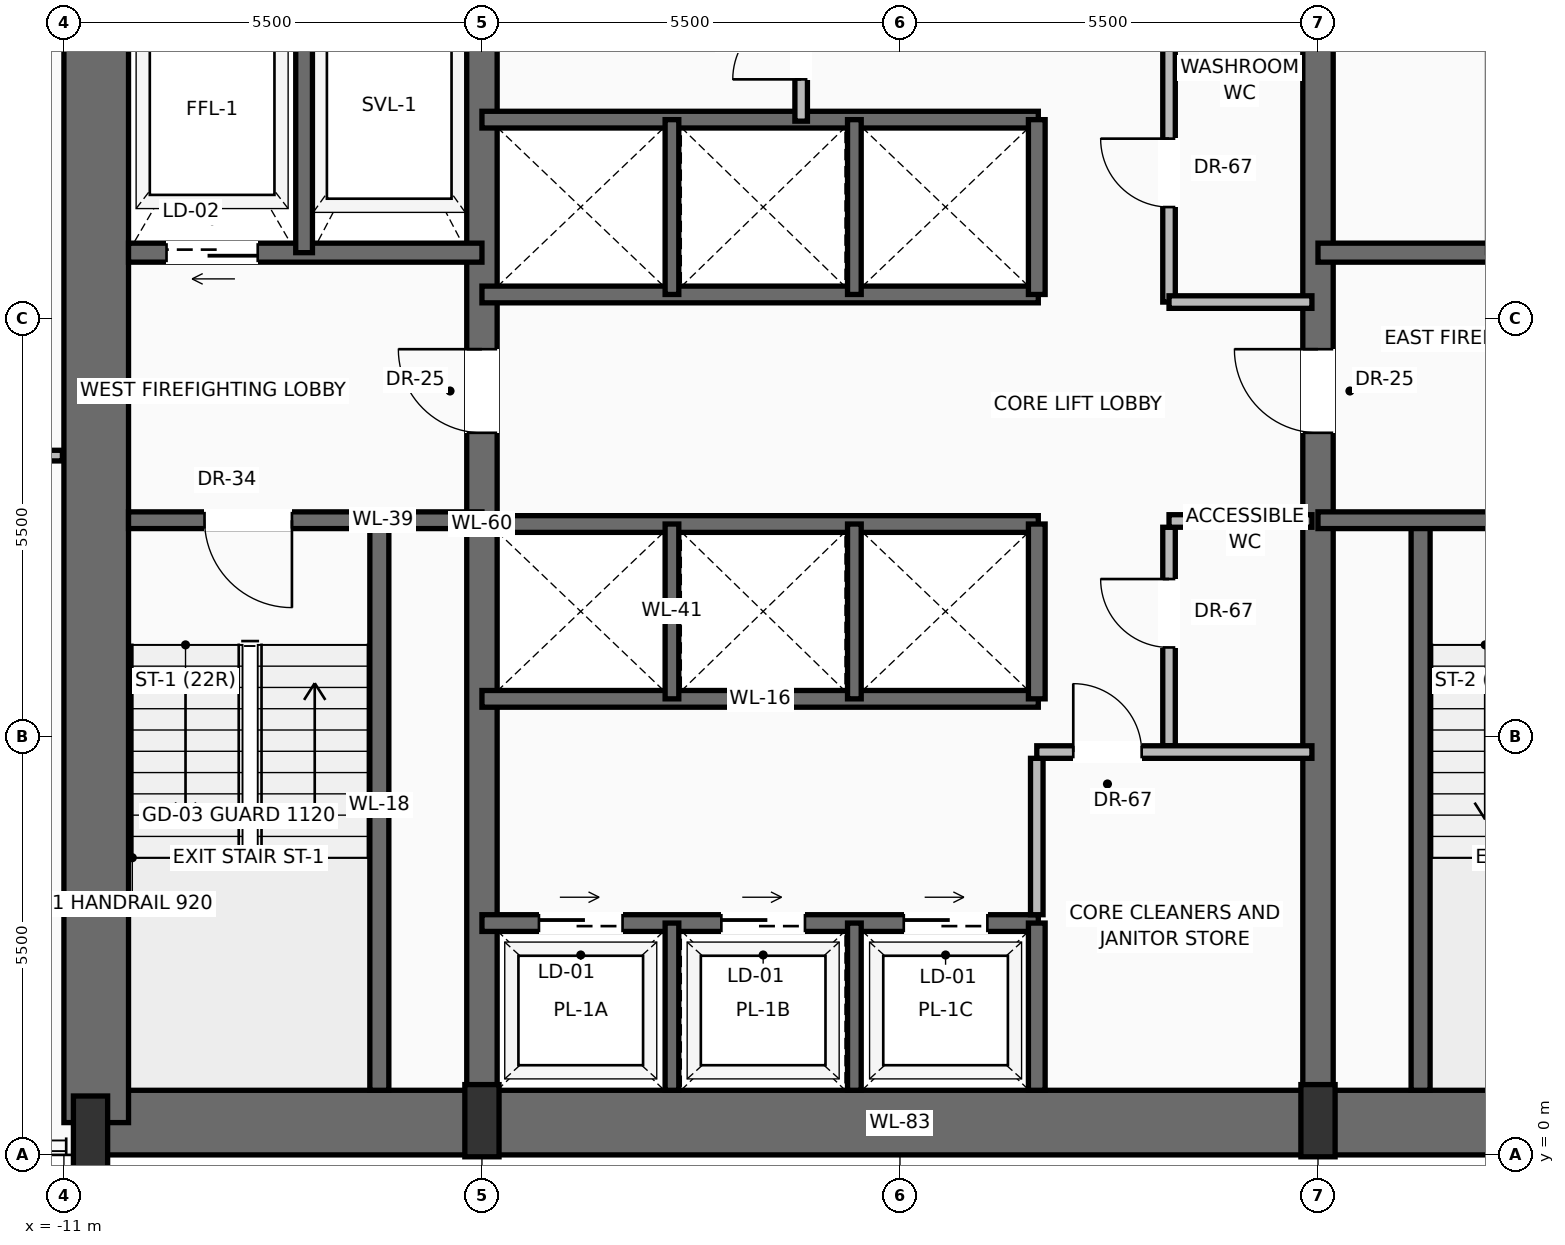
"""IFC4 building model, lengths in metres.
Left out: names, types, materials, properties, quantities, classifications, styles, units other than length and angle.
Written with IfcOpenShell. Run it as: python <this file> out.ifc"""

import sys

from ifc_helpers import new_model, si_unit, direction, frame, frame_2d, origin, origin_2d, place, context, subcontext, project, spatial, rectangle, extrude, source, transform, mapped, element, fill, save


model = new_model("IFC4")
c1 = context("Model", 3, precision=1e-05, world=origin(), true_north=direction((0.0, 1.0)))
c2 = subcontext(c1, "Body", "Model", "MODEL_VIEW")
j1 = project(units=[si_unit("LENGTHUNIT", "METRE"), si_unit("PLANEANGLEUNIT", "RADIAN")], contexts=[c1])
p1 = place(None, origin())
s1 = spatial("IfcSite", under=j1, at=p1, CompositionType="ELEMENT")
p2 = place(p1, origin())
s2 = spatial("IfcBuilding", under=s1, at=p2, CompositionType="ELEMENT")
p3 = place(p2, frame((0.0, 0.0, 68.2)))
s3 = spatial("IfcBuildingStorey", under=s2, at=p3, CompositionType="ELEMENT", Elevation=68.2)
p4 = place(p3, frame((-10.65, 0.425, 0.0), z_axis=(0.0, 0.0, 1.0), x_axis=(1.0, 0.0, 0.0)))
e1 = element("IfcWall", 1, at=p4, inside=s3, PredefinedType="SHEAR", context=c2, shape_type="SweptSolid", body=[
    extrude(rectangle(XDim=21.3, YDim=0.85, at=frame_2d((10.65, 0.0))), origin(), (0.0, 0.0, 1.0), 3.4),
])
p5 = place(p3, frame((-10.575, 0.425, 0.0), z_axis=(0.0, 0.0, 1.0), x_axis=(0.0, 1.0, 0.0)))
e2 = element("IfcWall", 2, at=p5, inside=s3, PredefinedType="SHEAR", context=c2, shape_type="SweptSolid", body=[
    extrude(rectangle(XDim=15.75, YDim=0.85, at=frame_2d((7.875, 0.0))), origin(), (0.0, 0.0, 1.0), 3.4),
])
p6 = place(p3, frame((-5.5, 0.425, 0.0), z_axis=(0.0, 0.0, 1.0), x_axis=(0.0, 1.0, 0.0)))
e3 = element("IfcWall", 3, at=p6, inside=s3, PredefinedType="SHEAR", context=c2, shape_type="SweptSolid", body=[
    extrude(rectangle(XDim=15.75, YDim=0.4, at=frame_2d((7.875, 0.0))), origin(), (0.0, 0.0, 1.0), 3.4),
])
p7 = place(p6, frame((9.075, 0.0, 0.0)))
e4 = element("IfcOpeningElement", 4, at=p7, cuts=e3, PredefinedType="OPENING", context=c2, shape_type="SweptSolid", body=[
    extrude(rectangle(XDim=1.1, YDim=2.2, at=frame_2d((0.55, 1.1))), frame((0.0, 0.21, 0.0), z_axis=(0.0, -1.0, 0.0), x_axis=(1.0, 0.0, 0.0)), (0.0, 0.0, 1.0), 0.42),
])
p8 = place(p3, frame((5.5, 0.425, 0.0), z_axis=(0.0, 0.0, 1.0), x_axis=(0.0, 1.0, 0.0)))
e5 = element("IfcWall", 5, at=p8, inside=s3, PredefinedType="SHEAR", context=c2, shape_type="SweptSolid", body=[
    extrude(rectangle(XDim=15.75, YDim=0.4, at=frame_2d((7.875, 0.0))), origin(), (0.0, 0.0, 1.0), 3.4),
])
p9 = place(p8, frame((9.075, 0.0, 0.0)))
e6 = element("IfcOpeningElement", 6, at=p9, cuts=e5, PredefinedType="OPENING", context=c2, shape_type="SweptSolid", body=[
    extrude(rectangle(XDim=1.1, YDim=2.2, at=frame_2d((0.55, 1.1))), frame((0.0, 0.21, 0.0), z_axis=(0.0, -1.0, 0.0), x_axis=(1.0, 0.0, 0.0)), (0.0, 0.0, 1.0), 0.42),
])
m1 = source(origin(), c2, "Body", "SweptSolid", [
    extrude(rectangle(XDim=0.45, YDim=0.95, at=origin_2d()), origin(), (0.0, 0.0, 1.0), 3.7),
])
for number, where, z_axis, x_axis in (
    (7, (-10.65, 0.3, 0.0), (0.0, 0.0, 1.0), (1.0, 0.0, 0.0)),
    (8, (-5.5, 0.45, 0.0), (0.0, 0.0, 1.0), (1.0, 0.0, 0.0)),
    (9, (5.5, 0.45, 0.0), (0.0, 0.0, 1.0), (1.0, 0.0, 0.0)),
):
    element("IfcColumn", number, at=place(p3, frame(where, z_axis=z_axis, x_axis=x_axis)), inside=s3, PredefinedType="PILASTER", context=c2, shape_type="MappedRepresentation", body=[
        mapped(m1, transform((0.0, 0.0, 0.0), scale=1.0)),
    ])
p10 = place(p3, frame((-6.85, 0.85, 0.0), z_axis=(0.0, 0.0, 1.0), x_axis=(0.0, 1.0, 0.0)))
e10 = element("IfcWall", 10, at=p10, inside=s3, PredefinedType="SOLIDWALL", context=c2, shape_type="SweptSolid", body=[
    extrude(rectangle(XDim=7.5, YDim=0.25, at=frame_2d((3.75, 0.0))), origin(), (0.0, 0.0, 1.0), 3.4),
])
p11 = place(p3, frame((-5.5, 8.35, 0.0), z_axis=(0.0, 0.0, 1.0), x_axis=(-1.0, 0.0, 0.0)))
e11 = element("IfcWall", 11, at=p11, inside=s3, PredefinedType="SOLIDWALL", context=c2, shape_type="SweptSolid", body=[
    extrude(rectangle(XDim=4.65, YDim=0.22, at=frame_2d((2.325, 0.0))), origin(), (0.0, 0.0, 1.0), 3.4),
])
p12 = place(p11, frame((2.5, 0.0, 0.0)))
e12 = element("IfcOpeningElement", 12, at=p12, cuts=e11, PredefinedType="OPENING", context=c2, shape_type="SweptSolid", body=[
    extrude(rectangle(XDim=1.15, YDim=2.2, at=frame_2d((0.575, 1.1))), frame((0.0, 0.12, 0.0), z_axis=(0.0, -1.0, 0.0), x_axis=(1.0, 0.0, 0.0)), (0.0, 0.0, 1.0), 0.24),
])
p13 = place(p3, frame((-5.5, 11.87, 0.0), z_axis=(0.0, 0.0, 1.0), x_axis=(-1.0, 0.0, 0.0)))
e13 = element("IfcWall", 13, at=p13, inside=s3, PredefinedType="SOLIDWALL", context=c2, shape_type="SweptSolid", body=[
    extrude(rectangle(XDim=4.65, YDim=0.25, at=frame_2d((2.325, 0.0))), origin(), (0.0, 0.0, 1.0), 3.4),
])
p14 = place(p13, frame((2.95, 0.0, 0.0)))
e14 = element("IfcOpeningElement", 14, at=p14, cuts=e13, PredefinedType="OPENING", context=c2, shape_type="SweptSolid", body=[
    extrude(rectangle(XDim=1.2, YDim=2.25, at=frame_2d((0.6, 1.125))), frame((0.0, 0.135, 0.0), z_axis=(0.0, -1.0, 0.0), x_axis=(1.0, 0.0, 0.0)), (0.0, 0.0, 1.0), 0.27),
])
p15 = place(p3, frame((-7.84, 11.87, 0.0), z_axis=(0.0, 0.0, 1.0), x_axis=(0.0, 1.0, 0.0)))
e15 = element("IfcWall", 15, at=p15, inside=s3, PredefinedType="SOLIDWALL", context=c2, shape_type="SweptSolid", body=[
    extrude(rectangle(XDim=3.88, YDim=0.22, at=frame_2d((1.94, 0.0))), origin(), (0.0, 0.0, 1.0), 3.4),
])
p16 = place(p3, frame((6.85, 0.85, 0.0), z_axis=(0.0, 0.0, 1.0), x_axis=(0.0, 1.0, 0.0)))
e16 = element("IfcWall", 16, at=p16, inside=s3, PredefinedType="SOLIDWALL", context=c2, shape_type="SweptSolid", body=[
    extrude(rectangle(XDim=7.5, YDim=0.25, at=frame_2d((3.75, 0.0))), origin(), (0.0, 0.0, 1.0), 3.4),
])
p17 = place(p3, frame((10.15, 8.35, 0.0), z_axis=(0.0, 0.0, 1.0), x_axis=(-1.0, 0.0, 0.0)))
e17 = element("IfcWall", 17, at=p17, inside=s3, PredefinedType="SOLIDWALL", context=c2, shape_type="SweptSolid", body=[
    extrude(rectangle(XDim=4.65, YDim=0.22, at=frame_2d((2.325, 0.0))), origin(), (0.0, 0.0, 1.0), 3.4),
])
p18 = place(p17, frame((1.0, 0.0, 0.0)))
e18 = element("IfcOpeningElement", 18, at=p18, cuts=e17, PredefinedType="OPENING", context=c2, shape_type="SweptSolid", body=[
    extrude(rectangle(XDim=1.15, YDim=2.2, at=frame_2d((0.575, 1.1))), frame((0.0, 0.12, 0.0), z_axis=(0.0, -1.0, 0.0), x_axis=(1.0, 0.0, 0.0)), (0.0, 0.0, 1.0), 0.24),
])
p19 = place(p3, frame((10.15, 11.87, 0.0), z_axis=(0.0, 0.0, 1.0), x_axis=(-1.0, 0.0, 0.0)))
e19 = element("IfcWall", 19, at=p19, inside=s3, PredefinedType="SOLIDWALL", context=c2, shape_type="SweptSolid", body=[
    extrude(rectangle(XDim=4.65, YDim=0.25, at=frame_2d((2.325, 0.0))), origin(), (0.0, 0.0, 1.0), 3.4),
])
p20 = place(p19, frame((0.5, 0.0, 0.0)))
e20 = element("IfcOpeningElement", 20, at=p20, cuts=e19, PredefinedType="OPENING", context=c2, shape_type="SweptSolid", body=[
    extrude(rectangle(XDim=1.2, YDim=2.25, at=frame_2d((0.6, 1.125))), frame((0.0, 0.135, 0.0), z_axis=(0.0, -1.0, 0.0), x_axis=(1.0, 0.0, 0.0)), (0.0, 0.0, 1.0), 0.27),
])
p21 = place(p3, frame((-5.5, 3.05, 0.0), z_axis=(0.0, 0.0, 1.0), x_axis=(1.0, 0.0, 0.0)))
e21 = element("IfcWall", 21, at=p21, inside=s3, PredefinedType="SOLIDWALL", context=c2, shape_type="SweptSolid", body=[
    extrude(rectangle(XDim=7.32, YDim=0.22, at=frame_2d((3.66, 0.0))), origin(), (0.0, 0.0, 1.0), 3.4),
])
p22 = place(p21, frame((0.75, 0.0, 0.0)))
e22 = element("IfcOpeningElement", 22, at=p22, cuts=e21, PredefinedType="OPENING", context=c2, shape_type="SweptSolid", body=[
    extrude(rectangle(XDim=1.1, YDim=2.2, at=frame_2d((0.55, 1.1))), frame((0.0, 0.12, 0.0), z_axis=(0.0, -1.0, 0.0), x_axis=(1.0, 0.0, 0.0)), (0.0, 0.0, 1.0), 0.24),
])
p23 = place(p21, frame((3.15, 0.0, 0.0)))
e23 = element("IfcOpeningElement", 23, at=p23, cuts=e21, PredefinedType="OPENING", context=c2, shape_type="SweptSolid", body=[
    extrude(rectangle(XDim=1.1, YDim=2.2, at=frame_2d((0.55, 1.1))), frame((0.0, 0.12, 0.0), z_axis=(0.0, -1.0, 0.0), x_axis=(1.0, 0.0, 0.0)), (0.0, 0.0, 1.0), 0.24),
])
p24 = place(p21, frame((5.55, 0.0, 0.0)))
e24 = element("IfcOpeningElement", 24, at=p24, cuts=e21, PredefinedType="OPENING", context=c2, shape_type="SweptSolid", body=[
    extrude(rectangle(XDim=1.1, YDim=2.2, at=frame_2d((0.55, 1.1))), frame((0.0, 0.12, 0.0), z_axis=(0.0, -1.0, 0.0), x_axis=(1.0, 0.0, 0.0)), (0.0, 0.0, 1.0), 0.24),
])
p25 = place(p3, frame((1.8, 0.85, 0.0), z_axis=(0.0, 0.0, 1.0), x_axis=(0.0, 1.0, 0.0)))
e25 = element("IfcWall", 25, at=p25, inside=s3, PredefinedType="SOLIDWALL", context=c2, shape_type="SweptSolid", body=[
    extrude(rectangle(XDim=2.2, YDim=0.22, at=frame_2d((1.1, 0.0))), origin(), (0.0, 0.0, 1.0), 3.4),
])
for number, where, z_axis, x_axis in (
    (26, (-3.0, 0.85, 0.0), (0.0, 0.0, 1.0), (0.0, 1.0, 0.0)),
    (27, (-0.6, 0.85, 0.0), (0.0, 0.0, 1.0), (0.0, 1.0, 0.0)),
):
    element("IfcWall", number, at=place(p3, frame(where, z_axis=z_axis, x_axis=x_axis)), inside=s3, PredefinedType="SOLIDWALL", context=c2, shape_type="SweptSolid", body=[
        extrude(rectangle(XDim=2.2, YDim=0.18, at=frame_2d((1.1, 0.0))), origin(), (0.0, 0.0, 1.0), 3.4),
    ])
p26 = place(p3, frame((1.8, 3.16, 0.0), z_axis=(0.0, 0.0, 1.0), x_axis=(0.0, 1.0, 0.0)))
e28 = element("IfcWall", 28, at=p26, inside=s3, PredefinedType="PARTITIONING", context=c2, shape_type="SweptSolid", body=[
    extrude(rectangle(XDim=2.058, YDim=0.165, at=frame_2d((1.029, 0.0))), origin(), (0.0, 0.0, 1.0), 3.392),
])
p27 = place(p3, frame((3.54, 5.383, 0.0), z_axis=(0.0, 0.0, 1.0), x_axis=(0.0, 1.0, 0.0)))
e29 = element("IfcWall", 29, at=p27, inside=s3, PredefinedType="PARTITIONING", context=c2, shape_type="SweptSolid", body=[
    extrude(rectangle(XDim=2.875, YDim=0.165, at=frame_2d((1.438, 0.0))), origin(), (0.0, 0.0, 1.0), 3.392),
])
p28 = place(p27, frame((1.294, 0.0, 0.0)))
e30 = element("IfcOpeningElement", 30, at=p28, cuts=e29, PredefinedType="OPENING", context=c2, shape_type="SweptSolid", body=[
    extrude(rectangle(XDim=0.9, YDim=2.1, at=frame_2d((0.45, 1.05))), frame((0.0, 0.093, 0.0), z_axis=(0.0, -1.0, 0.0), x_axis=(1.0, 0.0, 0.0)), (0.0, 0.0, 1.0), 0.185),
])
p29 = place(p3, frame((3.54, 8.34, 0.0), z_axis=(0.0, 0.0, 1.0), x_axis=(1.0, 0.0, 0.0)))
e31 = element("IfcWall", 31, at=p29, inside=s3, PredefinedType="PARTITIONING", context=c2, shape_type="SweptSolid", body=[
    extrude(rectangle(XDim=1.88, YDim=0.165, at=frame_2d((0.94, 0.0))), origin(), (0.0, 0.0, 1.0), 3.392),
])
p30 = place(p3, frame((1.8, 5.3, 0.0), z_axis=(0.0, 0.0, 1.0), x_axis=(1.0, 0.0, 0.0)))
e32 = element("IfcWall", 32, at=p30, inside=s3, PredefinedType="PARTITIONING", context=c2, shape_type="SweptSolid", body=[
    extrude(rectangle(XDim=3.62, YDim=0.165, at=frame_2d((1.81, 0.0))), origin(), (0.0, 0.0, 1.0), 3.392),
])
p31 = place(p30, frame((0.48, 0.0, 0.0)))
e33 = element("IfcOpeningElement", 33, at=p31, cuts=e32, PredefinedType="OPENING", context=c2, shape_type="SweptSolid", body=[
    extrude(rectangle(XDim=0.9, YDim=2.1, at=frame_2d((0.45, 1.05))), frame((0.0, 0.093, 0.0), z_axis=(0.0, -1.0, 0.0), x_axis=(1.0, 0.0, 0.0)), (0.0, 0.0, 1.0), 0.185),
])
for number, where, z_axis, x_axis in (
    (34, (-5.5, 6.0, 0.0), (0.0, 0.0, 1.0), (1.0, 0.0, 0.0)),
    (35, (-5.5, 8.3, 0.0), (0.0, 0.0, 1.0), (1.0, 0.0, 0.0)),
):
    element("IfcWall", number, at=place(p3, frame(where, z_axis=z_axis, x_axis=x_axis)), inside=s3, PredefinedType="SOLIDWALL", context=c2, shape_type="SweptSolid", body=[
        extrude(rectangle(XDim=7.32, YDim=0.22, at=frame_2d((3.66, 0.0))), origin(), (0.0, 0.0, 1.0), 3.4),
    ])
p32 = place(p3, frame((1.8, 6.0, 0.0), z_axis=(0.0, 0.0, 1.0), x_axis=(0.0, 1.0, 0.0)))
e36 = element("IfcWall", 36, at=p32, inside=s3, PredefinedType="SOLIDWALL", context=c2, shape_type="SweptSolid", body=[
    extrude(rectangle(XDim=2.3, YDim=0.22, at=frame_2d((1.15, 0.0))), origin(), (0.0, 0.0, 1.0), 3.4),
])
for number, where, z_axis, x_axis in (
    (37, (-3.0, 6.0, 0.0), (0.0, 0.0, 1.0), (0.0, 1.0, 0.0)),
    (38, (-0.6, 6.0, 0.0), (0.0, 0.0, 1.0), (0.0, 1.0, 0.0)),
):
    element("IfcWall", number, at=place(p3, frame(where, z_axis=z_axis, x_axis=x_axis)), inside=s3, PredefinedType="SOLIDWALL", context=c2, shape_type="SweptSolid", body=[
        extrude(rectangle(XDim=2.3, YDim=0.18, at=frame_2d((1.15, 0.0))), origin(), (0.0, 0.0, 1.0), 3.4),
    ])
for number, where, z_axis, x_axis in (
    (39, (-5.5, 11.32, 0.0), (0.0, 0.0, 1.0), (1.0, 0.0, 0.0)),
    (40, (-5.5, 13.62, 0.0), (0.0, 0.0, 1.0), (1.0, 0.0, 0.0)),
):
    element("IfcWall", number, at=place(p3, frame(where, z_axis=z_axis, x_axis=x_axis)), inside=s3, PredefinedType="SOLIDWALL", context=c2, shape_type="SweptSolid", body=[
        extrude(rectangle(XDim=7.32, YDim=0.22, at=frame_2d((3.66, 0.0))), origin(), (0.0, 0.0, 1.0), 3.4),
    ])
p33 = place(p3, frame((1.8, 11.32, 0.0), z_axis=(0.0, 0.0, 1.0), x_axis=(0.0, 1.0, 0.0)))
e41 = element("IfcWall", 41, at=p33, inside=s3, PredefinedType="SOLIDWALL", context=c2, shape_type="SweptSolid", body=[
    extrude(rectangle(XDim=2.3, YDim=0.22, at=frame_2d((1.15, 0.0))), origin(), (0.0, 0.0, 1.0), 3.4),
])
for number, where, z_axis, x_axis in (
    (42, (-3.0, 11.32, 0.0), (0.0, 0.0, 1.0), (0.0, 1.0, 0.0)),
    (43, (-0.6, 11.32, 0.0), (0.0, 0.0, 1.0), (0.0, 1.0, 0.0)),
):
    element("IfcWall", number, at=place(p3, frame(where, z_axis=z_axis, x_axis=x_axis)), inside=s3, PredefinedType="SOLIDWALL", context=c2, shape_type="SweptSolid", body=[
        extrude(rectangle(XDim=2.3, YDim=0.18, at=frame_2d((1.15, 0.0))), origin(), (0.0, 0.0, 1.0), 3.4),
    ])
p34 = place(p3, frame((-1.3, 13.6, 0.0), z_axis=(0.0, 0.0, 1.0), x_axis=(0.0, 1.0, 0.0)))
e44 = element("IfcWall", 44, at=p34, inside=s3, PredefinedType="PARTITIONING", context=c2, shape_type="SweptSolid", body=[
    extrude(rectangle(XDim=2.15, YDim=0.165, at=frame_2d((1.075, 0.0))), origin(), (0.0, 0.0, 1.0), 3.392),
])
p35 = place(p34, frame((0.55, 0.0, 0.0)))
e45 = element("IfcOpeningElement", 45, at=p35, cuts=e44, PredefinedType="OPENING", context=c2, shape_type="SweptSolid", body=[
    extrude(rectangle(XDim=0.9, YDim=2.1, at=frame_2d((0.45, 1.05))), frame((0.0, 0.093, 0.0), z_axis=(0.0, -1.0, 0.0), x_axis=(1.0, 0.0, 0.0)), (0.0, 0.0, 1.0), 0.185),
])
p36 = place(p3, frame((3.54, 11.22, 0.0), z_axis=(0.0, 0.0, 1.0), x_axis=(0.0, 1.0, 0.0)))
e46 = element("IfcWall", 46, at=p36, inside=s3, PredefinedType="PARTITIONING", context=c2, shape_type="SweptSolid", body=[
    extrude(rectangle(XDim=4.53, YDim=0.165, at=frame_2d((2.265, 0.0))), origin(), (0.0, 0.0, 1.0), 3.392),
])
p37 = place(p36, frame((1.25, 0.0, 0.0)))
e47 = element("IfcOpeningElement", 47, at=p37, cuts=e46, PredefinedType="OPENING", context=c2, shape_type="SweptSolid", body=[
    extrude(rectangle(XDim=0.9, YDim=2.1, at=frame_2d((0.45, 1.05))), frame((0.0, 0.093, 0.0), z_axis=(0.0, -1.0, 0.0), x_axis=(1.0, 0.0, 0.0)), (0.0, 0.0, 1.0), 0.185),
])
p38 = place(p3, frame((3.54, 11.22, 0.0), z_axis=(0.0, 0.0, 1.0), x_axis=(1.0, 0.0, 0.0)))
e48 = element("IfcWall", 48, at=p38, inside=s3, PredefinedType="PARTITIONING", context=c2, shape_type="SweptSolid", body=[
    extrude(rectangle(XDim=1.88, YDim=0.165, at=frame_2d((0.94, 0.0))), origin(), (0.0, 0.0, 1.0), 3.392),
])
p39 = place(p3, frame((-27.867, 9.2, 0.0), z_axis=(0.0, 0.0, 1.0), x_axis=(1.0, 0.0, 0.0)))
e49 = element("IfcWall", 49, at=p39, inside=s3, PredefinedType="PARTITIONING", context=c2, shape_type="SweptSolid", body=[
    extrude(rectangle(XDim=16.847, YDim=0.14, at=frame_2d((8.423, 0.0))), origin(), (0.0, 0.0, 1.0), 3.392),
])
p40 = place(p39, frame((7.959, 0.0, 0.0)))
e50 = element("IfcOpeningElement", 50, at=p40, cuts=e49, PredefinedType="OPENING", context=c2, shape_type="SweptSolid", body=[
    extrude(rectangle(XDim=0.95, YDim=2.2, at=frame_2d((0.475, 1.1))), frame((0.0, 0.08, 0.0), z_axis=(0.0, -1.0, 0.0), x_axis=(1.0, 0.0, 0.0)), (0.0, 0.0, 1.0), 0.16),
])
m2 = source(origin(), c2, "Body", "SweptSolid", [
    extrude(rectangle(XDim=1.15, YDim=2.2, at=frame_2d((0.575, 1.1))), frame((0.0, 0.025, 0.0), z_axis=(0.0, -1.0, 0.0), x_axis=(1.0, 0.0, 0.0)), (0.0, 0.0, 1.0), 0.05),
])
p41 = place(p12, origin())
e51 = element("IfcDoor", 51, at=p41, inside=s3, OperationType="SINGLE_SWING_LEFT", PredefinedType="DOOR", context=c2, shape_type="MappedRepresentation", body=[
    mapped(m2, transform((0.0, 0.0, 0.0), scale=1.0)),
])
fill(e12, e51)
m3 = source(origin(), c2, "Body", "SweptSolid", [
    extrude(rectangle(XDim=1.1, YDim=2.2, at=frame_2d((0.55, 1.1))), frame((0.0, 0.025, 0.0), z_axis=(0.0, -1.0, 0.0), x_axis=(1.0, 0.0, 0.0)), (0.0, 0.0, 1.0), 0.05),
])
p42 = place(p7, origin())
e52 = element("IfcDoor", 52, at=p42, inside=s3, OperationType="SINGLE_SWING_RIGHT", PredefinedType="DOOR", context=c2, shape_type="MappedRepresentation", body=[
    mapped(m3, transform((0.0, 0.0, 0.0), scale=1.0)),
])
fill(e4, e52)
m4 = source(origin(), c2, "Body", "SweptSolid", [
    extrude(rectangle(XDim=1.2, YDim=2.25, at=frame_2d((0.6, 1.125))), frame((0.0, 0.025, 0.0), z_axis=(0.0, -1.0, 0.0), x_axis=(1.0, 0.0, 0.0)), (0.0, 0.0, 1.0), 0.05),
])
p43 = place(p14, origin())
e53 = element("IfcDoor", 53, at=p43, inside=s3, OperationType="SLIDING_TO_LEFT", PredefinedType="DOOR", context=c2, shape_type="MappedRepresentation", body=[
    mapped(m4, transform((0.0, 0.0, 0.0), scale=1.0)),
])
fill(e14, e53)
p44 = place(p9, origin())
e54 = element("IfcDoor", 54, at=p44, inside=s3, OperationType="SINGLE_SWING_RIGHT", PredefinedType="DOOR", context=c2, shape_type="MappedRepresentation", body=[
    mapped(m3, transform((0.0, 0.0, 0.0), scale=1.0)),
])
fill(e6, e54)
m5 = source(origin(), c2, "Body", "SweptSolid", [
    extrude(rectangle(XDim=1.1, YDim=2.2, at=frame_2d((0.55, 1.1))), frame((0.0, 0.025, 0.0), z_axis=(0.0, -1.0, 0.0), x_axis=(1.0, 0.0, 0.0)), (0.0, 0.0, 1.0), 0.05),
])
p45 = place(p22, origin())
e55 = element("IfcDoor", 55, at=p45, inside=s3, OperationType="SLIDING_TO_RIGHT", PredefinedType="DOOR", context=c2, shape_type="MappedRepresentation", body=[
    mapped(m5, transform((0.0, 0.0, 0.0), scale=1.0)),
])
fill(e22, e55)
p46 = place(p23, origin())
e56 = element("IfcDoor", 56, at=p46, inside=s3, OperationType="SLIDING_TO_RIGHT", PredefinedType="DOOR", context=c2, shape_type="MappedRepresentation", body=[
    mapped(m5, transform((0.0, 0.0, 0.0), scale=1.0)),
])
fill(e23, e56)
p47 = place(p24, origin())
e57 = element("IfcDoor", 57, at=p47, inside=s3, OperationType="SLIDING_TO_RIGHT", PredefinedType="DOOR", context=c2, shape_type="MappedRepresentation", body=[
    mapped(m5, transform((0.0, 0.0, 0.0), scale=1.0)),
])
fill(e24, e57)
m6 = source(origin(), c2, "Body", "SweptSolid", [
    extrude(rectangle(XDim=0.9, YDim=2.1, at=frame_2d((0.45, 1.05))), frame((0.0, 0.025, 0.0), z_axis=(0.0, -1.0, 0.0), x_axis=(1.0, 0.0, 0.0)), (0.0, 0.0, 1.0), 0.05),
])
p48 = place(p31, origin())
e58 = element("IfcDoor", 58, at=p48, inside=s3, OperationType="SINGLE_SWING_LEFT", PredefinedType="DOOR", context=c2, shape_type="MappedRepresentation", body=[
    mapped(m6, transform((0.0, 0.0, 0.0), scale=1.0)),
])
fill(e33, e58)
p49 = place(p28, origin())
e59 = element("IfcDoor", 59, at=p49, inside=s3, OperationType="SINGLE_SWING_RIGHT", PredefinedType="DOOR", context=c2, shape_type="MappedRepresentation", body=[
    mapped(m6, transform((0.0, 0.0, 0.0), scale=1.0)),
])
fill(e30, e59)
p50 = place(p35, origin())
e60 = element("IfcDoor", 60, at=p50, inside=s3, OperationType="SINGLE_SWING_LEFT", PredefinedType="DOOR", context=c2, shape_type="MappedRepresentation", body=[
    mapped(m6, transform((0.0, 0.0, 0.0), scale=1.0)),
])
fill(e45, e60)
p51 = place(p37, origin())
e61 = element("IfcDoor", 61, at=p51, inside=s3, OperationType="SINGLE_SWING_RIGHT", PredefinedType="DOOR", context=c2, shape_type="MappedRepresentation", body=[
    mapped(m6, transform((0.0, 0.0, 0.0), scale=1.0)),
])
fill(e47, e61)
save(model, sys.argv[1])
